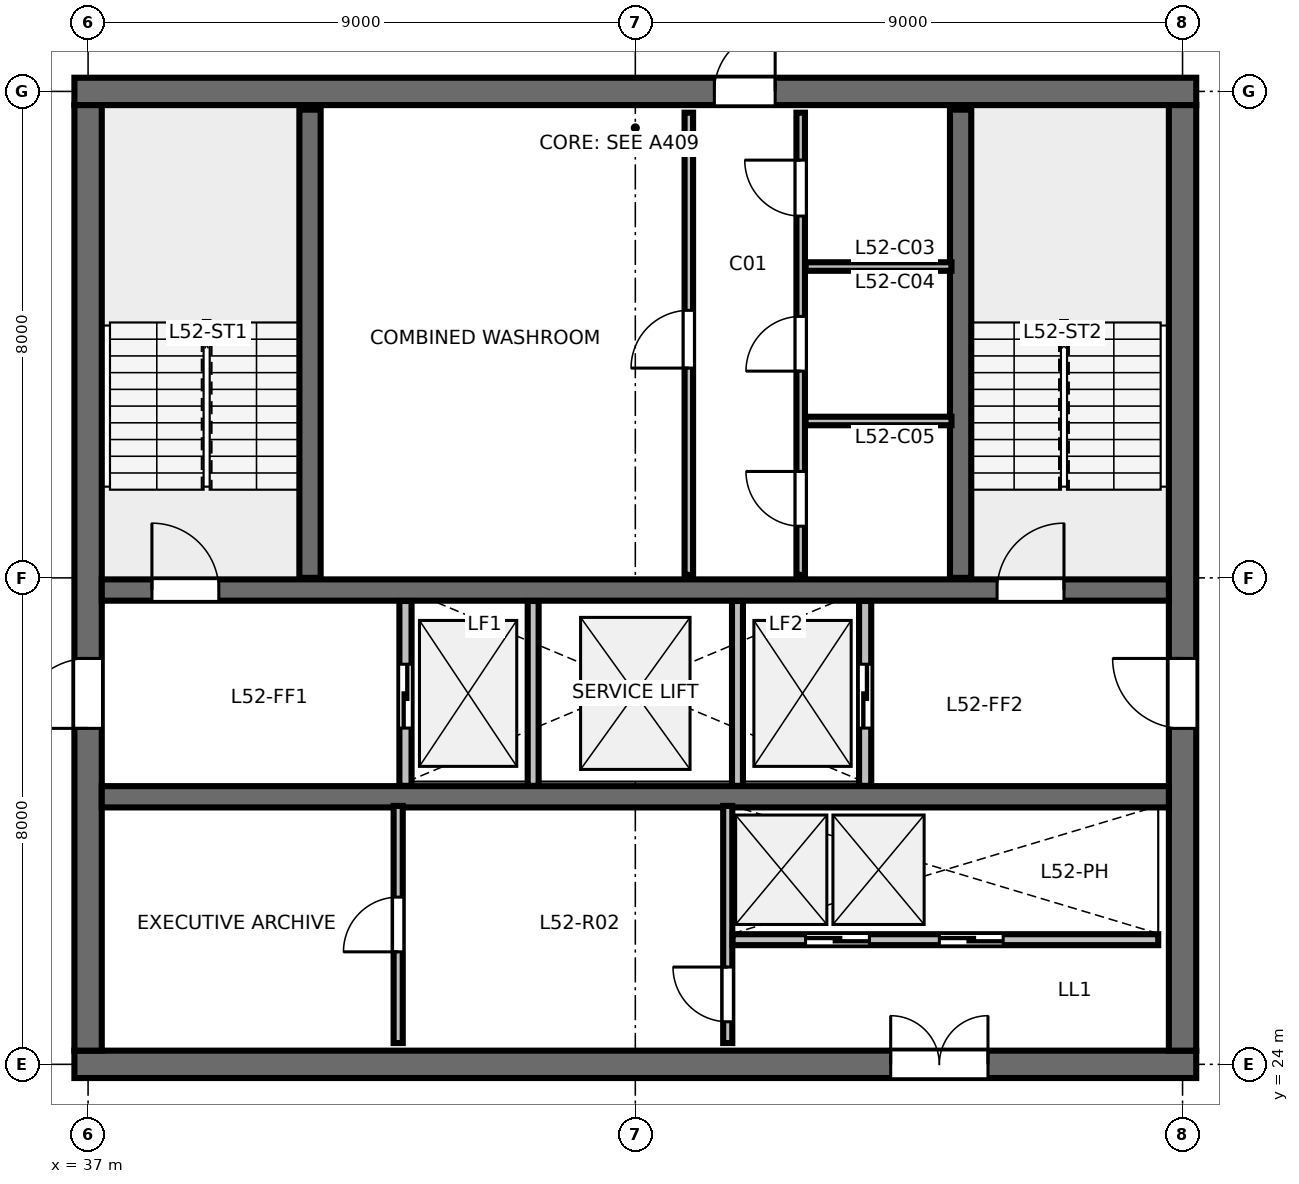
"""IFC4 building model, lengths in metres.
Left out: names, types, materials, properties, quantities, classifications, styles, units other than length and angle.
Written with IfcOpenShell. Run it as: python <this file> out.ifc"""

import sys

from ifc_helpers import new_model, si_unit, direction, frame, frame_2d, origin, place, context, subcontext, project, spatial, rectangle, extrude, element, fill, save


model = new_model("IFC4")
c1 = context("Model", 3, precision=1e-05, world=origin(), true_north=direction((0.0, 1.0)))
c2 = subcontext(c1, "Body", "Model", "MODEL_VIEW")
j1 = project(units=[si_unit("LENGTHUNIT", "METRE"), si_unit("PLANEANGLEUNIT", "RADIAN")], contexts=[c1])
p1 = place(None, origin())
s1 = spatial("IfcSite", under=j1, at=p1, CompositionType="ELEMENT")
p2 = place(p1, origin())
s2 = spatial("IfcBuilding", under=s1, at=p2, CompositionType="ELEMENT")
p3 = place(p2, frame((0.0, 0.0, 198.6)))
s3 = spatial("IfcBuildingStorey", under=s2, at=p3, CompositionType="ELEMENT", Elevation=198.6)
p4 = place(p3, frame((36.775, 24.0, 0.0), z_axis=(0.0, 0.0, 1.0), x_axis=(1.0, 0.0, 0.0)))
e1 = element("IfcWall", 1, at=p4, inside=s3, PredefinedType="SHEAR", context=c2, shape_type="SweptSolid", body=[
    extrude(rectangle(XDim=18.45, YDim=0.45, at=frame_2d((9.225, 0.0))), origin(), (0.0, 0.0, 1.0), 3.36),
])
p5 = place(p4, frame((13.425, 0.0, 0.0)))
e2 = element("IfcOpeningElement", 2, at=p5, cuts=e1, PredefinedType="OPENING", context=c2, shape_type="SweptSolid", body=[
    extrude(rectangle(XDim=1.6, YDim=2.15, at=frame_2d((0.8, 1.075))), frame((0.0, 0.235, 0.0), z_axis=(0.0, -1.0, 0.0), x_axis=(1.0, 0.0, 0.0)), (0.0, 0.0, 1.0), 0.47),
])
p6 = place(p3, frame((36.775, 40.0, 0.0), z_axis=(0.0, 0.0, 1.0), x_axis=(1.0, 0.0, 0.0)))
e3 = element("IfcWall", 3, at=p6, inside=s3, PredefinedType="SHEAR", context=c2, shape_type="SweptSolid", body=[
    extrude(rectangle(XDim=18.45, YDim=0.45, at=frame_2d((9.225, 0.0))), origin(), (0.0, 0.0, 1.0), 3.36),
])
p7 = place(p6, frame((10.525, 0.0, 0.0)))
e4 = element("IfcOpeningElement", 4, at=p7, cuts=e3, PredefinedType="OPENING", context=c2, shape_type="SweptSolid", body=[
    extrude(rectangle(XDim=1.0, YDim=2.15, at=frame_2d((0.5, 1.075))), frame((0.0, 0.235, 0.0), z_axis=(0.0, -1.0, 0.0), x_axis=(1.0, 0.0, 0.0)), (0.0, 0.0, 1.0), 0.47),
])
p8 = place(p3, frame((37.0, 24.225, 0.0), z_axis=(0.0, 0.0, 1.0), x_axis=(0.0, 1.0, 0.0)))
e5 = element("IfcWall", 5, at=p8, inside=s3, PredefinedType="SHEAR", context=c2, shape_type="SweptSolid", body=[
    extrude(rectangle(XDim=15.55, YDim=0.45, at=frame_2d((7.775, 0.0))), origin(), (0.0, 0.0, 1.0), 3.36),
])
p9 = place(p8, frame((5.3, 0.0, 0.0)))
e6 = element("IfcOpeningElement", 6, at=p9, cuts=e5, PredefinedType="OPENING", context=c2, shape_type="SweptSolid", body=[
    extrude(rectangle(XDim=1.15, YDim=2.15, at=frame_2d((0.575, 1.075))), frame((0.0, 0.235, 0.0), z_axis=(0.0, -1.0, 0.0), x_axis=(1.0, 0.0, 0.0)), (0.0, 0.0, 1.0), 0.47),
])
p10 = place(p3, frame((55.0, 24.225, 0.0), z_axis=(0.0, 0.0, 1.0), x_axis=(0.0, 1.0, 0.0)))
e7 = element("IfcWall", 7, at=p10, inside=s3, PredefinedType="SHEAR", context=c2, shape_type="SweptSolid", body=[
    extrude(rectangle(XDim=15.55, YDim=0.45, at=frame_2d((7.775, 0.0))), origin(), (0.0, 0.0, 1.0), 3.36),
])
p11 = place(p10, frame((5.3, 0.0, 0.0)))
e8 = element("IfcOpeningElement", 8, at=p11, cuts=e7, PredefinedType="OPENING", context=c2, shape_type="SweptSolid", body=[
    extrude(rectangle(XDim=1.15, YDim=2.15, at=frame_2d((0.575, 1.075))), frame((0.0, 0.235, 0.0), z_axis=(0.0, -1.0, 0.0), x_axis=(1.0, 0.0, 0.0)), (0.0, 0.0, 1.0), 0.47),
])
p12 = place(p3, frame((37.225, 31.8, 0.0), z_axis=(0.0, 0.0, 1.0), x_axis=(1.0, 0.0, 0.0)))
e9 = element("IfcWall", 9, at=p12, inside=s3, PredefinedType="SHEAR", context=c2, shape_type="SweptSolid", body=[
    extrude(rectangle(XDim=17.55, YDim=0.35, at=frame_2d((8.775, 0.0))), origin(), (0.0, 0.0, 1.0), 3.36),
])
p13 = place(p12, frame((0.825, 0.0, 0.0)))
e10 = element("IfcOpeningElement", 10, at=p13, cuts=e9, PredefinedType="OPENING", context=c2, shape_type="SweptSolid", body=[
    extrude(rectangle(XDim=1.1, YDim=2.15, at=frame_2d((0.55, 1.075))), frame((0.0, 0.185, 0.0), z_axis=(0.0, -1.0, 0.0), x_axis=(1.0, 0.0, 0.0)), (0.0, 0.0, 1.0), 0.37),
])
p14 = place(p12, frame((14.725, 0.0, 0.0)))
e11 = element("IfcOpeningElement", 11, at=p14, cuts=e9, PredefinedType="OPENING", context=c2, shape_type="SweptSolid", body=[
    extrude(rectangle(XDim=1.1, YDim=2.15, at=frame_2d((0.55, 1.075))), frame((0.0, 0.185, 0.0), z_axis=(0.0, -1.0, 0.0), x_axis=(1.0, 0.0, 0.0)), (0.0, 0.0, 1.0), 0.37),
])
p15 = place(p3, frame((37.225, 28.4, 0.0), z_axis=(0.0, 0.0, 1.0), x_axis=(1.0, 0.0, 0.0)))
e12 = element("IfcWall", 12, at=p15, inside=s3, PredefinedType="SHEAR", context=c2, shape_type="SweptSolid", body=[
    extrude(rectangle(XDim=17.55, YDim=0.35, at=frame_2d((8.775, 0.0))), origin(), (0.0, 0.0, 1.0), 3.36),
])
for number, where, z_axis, x_axis in (
    (13, (40.65, 32.0, 0.0), (0.0, 0.0, 1.0), (0.0, 1.0, 0.0)),
    (14, (51.35, 32.0, 0.0), (0.0, 0.0, 1.0), (0.0, 1.0, 0.0)),
):
    element("IfcWall", number, at=place(p3, frame(where, z_axis=z_axis, x_axis=x_axis)), inside=s3, PredefinedType="SHEAR", context=c2, shape_type="SweptSolid", body=[
        extrude(rectangle(XDim=7.7, YDim=0.35, at=frame_2d((3.85, 0.0))), origin(), (0.0, 0.0, 1.0), 3.6),
    ])
p16 = place(p3, frame((46.88, 32.05, 0.0), z_axis=(0.0, 0.0, 1.0), x_axis=(0.0, 1.0, 0.0)))
e15 = element("IfcWall", 15, at=p16, inside=s3, PredefinedType="PARTITIONING", context=c2, shape_type="SweptSolid", body=[
    extrude(rectangle(XDim=7.6, YDim=0.14, at=frame_2d((3.8, 0.0))), origin(), (0.0, 0.0, 1.0), 3.375),
])
p17 = place(p16, frame((3.4, 0.0, 0.0)))
e16 = element("IfcOpeningElement", 16, at=p17, cuts=e15, PredefinedType="OPENING", context=c2, shape_type="SweptSolid", body=[
    extrude(rectangle(XDim=0.95, YDim=2.15, at=frame_2d((0.475, 1.075))), frame((0.0, 0.08, 0.0), z_axis=(0.0, -1.0, 0.0), x_axis=(1.0, 0.0, 0.0)), (0.0, 0.0, 1.0), 0.16),
])
p18 = place(p3, frame((48.72, 32.05, 0.0), z_axis=(0.0, 0.0, 1.0), x_axis=(0.0, 1.0, 0.0)))
e17 = element("IfcWall", 17, at=p18, inside=s3, PredefinedType="PARTITIONING", context=c2, shape_type="SweptSolid", body=[
    extrude(rectangle(XDim=7.6, YDim=0.14, at=frame_2d((3.8, 0.0))), origin(), (0.0, 0.0, 1.0), 3.375),
])
p19 = place(p18, frame((0.8, 0.0, 0.0)))
e18 = element("IfcOpeningElement", 18, at=p19, cuts=e17, PredefinedType="OPENING", context=c2, shape_type="SweptSolid", body=[
    extrude(rectangle(XDim=0.9, YDim=2.15, at=frame_2d((0.45, 1.075))), frame((0.0, 0.08, 0.0), z_axis=(0.0, -1.0, 0.0), x_axis=(1.0, 0.0, 0.0)), (0.0, 0.0, 1.0), 0.16),
])
p20 = place(p18, frame((3.35, 0.0, 0.0)))
e19 = element("IfcOpeningElement", 19, at=p20, cuts=e17, PredefinedType="OPENING", context=c2, shape_type="SweptSolid", body=[
    extrude(rectangle(XDim=0.9, YDim=2.15, at=frame_2d((0.45, 1.075))), frame((0.0, 0.08, 0.0), z_axis=(0.0, -1.0, 0.0), x_axis=(1.0, 0.0, 0.0)), (0.0, 0.0, 1.0), 0.16),
])
p21 = place(p18, frame((5.9, 0.0, 0.0)))
e20 = element("IfcOpeningElement", 20, at=p21, cuts=e17, PredefinedType="OPENING", context=c2, shape_type="SweptSolid", body=[
    extrude(rectangle(XDim=0.92, YDim=2.15, at=frame_2d((0.46, 1.075))), frame((0.0, 0.08, 0.0), z_axis=(0.0, -1.0, 0.0), x_axis=(1.0, 0.0, 0.0)), (0.0, 0.0, 1.0), 0.16),
])
for number, where, z_axis, x_axis in (
    (21, (48.8, 34.58, 0.0), (0.0, 0.0, 1.0), (1.0, 0.0, 0.0)),
    (22, (48.8, 37.12, 0.0), (0.0, 0.0, 1.0), (1.0, 0.0, 0.0)),
):
    element("IfcWall", number, at=place(p3, frame(where, z_axis=z_axis, x_axis=x_axis)), inside=s3, PredefinedType="PARTITIONING", context=c2, shape_type="SweptSolid", body=[
        extrude(rectangle(XDim=2.4, YDim=0.14, at=frame_2d((1.2, 0.0))), origin(), (0.0, 0.0, 1.0), 3.375),
    ])
p22 = place(p3, frame((42.22, 28.58, 0.0), z_axis=(0.0, 0.0, 1.0), x_axis=(0.0, 1.0, 0.0)))
e23 = element("IfcWall", 23, at=p22, inside=s3, PredefinedType="PARTITIONING", context=c2, shape_type="SweptSolid", body=[
    extrude(rectangle(XDim=3.04, YDim=0.2, at=frame_2d((1.52, 0.0))), origin(), (0.0, 0.0, 1.0), 3.375),
])
p23 = place(p22, frame((0.95, 0.0, 0.0)))
e24 = element("IfcOpeningElement", 24, at=p23, cuts=e23, PredefinedType="OPENING", context=c2, shape_type="SweptSolid", body=[
    extrude(rectangle(XDim=1.05, YDim=2.15, at=frame_2d((0.525, 1.075))), frame((0.0, 0.11, 0.0), z_axis=(0.0, -1.0, 0.0), x_axis=(1.0, 0.0, 0.0)), (0.0, 0.0, 1.0), 0.22),
])
p24 = place(p3, frame((49.78, 28.58, 0.0), z_axis=(0.0, 0.0, 1.0), x_axis=(0.0, 1.0, 0.0)))
e25 = element("IfcWall", 25, at=p24, inside=s3, PredefinedType="PARTITIONING", context=c2, shape_type="SweptSolid", body=[
    extrude(rectangle(XDim=3.04, YDim=0.2, at=frame_2d((1.52, 0.0))), origin(), (0.0, 0.0, 1.0), 3.375),
])
p25 = place(p24, frame((0.95, 0.0, 0.0)))
e26 = element("IfcOpeningElement", 26, at=p25, cuts=e25, PredefinedType="OPENING", context=c2, shape_type="SweptSolid", body=[
    extrude(rectangle(XDim=1.05, YDim=2.15, at=frame_2d((0.525, 1.075))), frame((0.0, 0.11, 0.0), z_axis=(0.0, -1.0, 0.0), x_axis=(1.0, 0.0, 0.0)), (0.0, 0.0, 1.0), 0.22),
])
for number, where, z_axis, x_axis in (
    (27, (44.32, 28.58, 0.0), (0.0, 0.0, 1.0), (0.0, 1.0, 0.0)),
    (28, (47.68, 28.58, 0.0), (0.0, 0.0, 1.0), (0.0, 1.0, 0.0)),
):
    element("IfcWall", number, at=place(p3, frame(where, z_axis=z_axis, x_axis=x_axis)), inside=s3, PredefinedType="PARTITIONING", context=c2, shape_type="SweptSolid", body=[
        extrude(rectangle(XDim=3.04, YDim=0.18, at=frame_2d((1.52, 0.0))), origin(), (0.0, 0.0, 1.0), 3.375),
    ])
p26 = place(p3, frame((42.1, 24.35, 0.0), z_axis=(0.0, 0.0, 1.0), x_axis=(0.0, 1.0, 0.0)))
e29 = element("IfcWall", 29, at=p26, inside=s3, PredefinedType="PARTITIONING", context=c2, shape_type="SweptSolid", body=[
    extrude(rectangle(XDim=3.9, YDim=0.15, at=frame_2d((1.95, 0.0))), origin(), (0.0, 0.0, 1.0), 3.375),
])
p27 = place(p26, frame((1.5, 0.0, 0.0)))
e30 = element("IfcOpeningElement", 30, at=p27, cuts=e29, PredefinedType="OPENING", context=c2, shape_type="SweptSolid", body=[
    extrude(rectangle(XDim=0.9, YDim=2.15, at=frame_2d((0.45, 1.075))), frame((0.0, 0.085, 0.0), z_axis=(0.0, -1.0, 0.0), x_axis=(1.0, 0.0, 0.0)), (0.0, 0.0, 1.0), 0.17),
])
p28 = place(p3, frame((47.52, 24.35, 0.0), z_axis=(0.0, 0.0, 1.0), x_axis=(0.0, 1.0, 0.0)))
e31 = element("IfcWall", 31, at=p28, inside=s3, PredefinedType="PARTITIONING", context=c2, shape_type="SweptSolid", body=[
    extrude(rectangle(XDim=3.9, YDim=0.15, at=frame_2d((1.95, 0.0))), origin(), (0.0, 0.0, 1.0), 3.375),
])
p29 = place(p28, frame((0.35, 0.0, 0.0)))
e32 = element("IfcOpeningElement", 32, at=p29, cuts=e31, PredefinedType="OPENING", context=c2, shape_type="SweptSolid", body=[
    extrude(rectangle(XDim=0.9, YDim=2.15, at=frame_2d((0.45, 1.075))), frame((0.0, 0.085, 0.0), z_axis=(0.0, -1.0, 0.0), x_axis=(1.0, 0.0, 0.0)), (0.0, 0.0, 1.0), 0.17),
])
p30 = place(p3, frame((47.6, 26.05, 0.0), z_axis=(0.0, 0.0, 1.0), x_axis=(1.0, 0.0, 0.0)))
e33 = element("IfcWall", 33, at=p30, inside=s3, PredefinedType="PARTITIONING", context=c2, shape_type="SweptSolid", body=[
    extrude(rectangle(XDim=7.0, YDim=0.18, at=frame_2d((3.5, 0.0))), origin(), (0.0, 0.0, 1.0), 3.375),
])
p31 = place(p30, frame((1.2, 0.0, 0.0)))
e34 = element("IfcOpeningElement", 34, at=p31, cuts=e33, PredefinedType="OPENING", context=c2, shape_type="SweptSolid", body=[
    extrude(rectangle(XDim=1.05, YDim=2.15, at=frame_2d((0.525, 1.075))), frame((0.0, 0.1, 0.0), z_axis=(0.0, -1.0, 0.0), x_axis=(1.0, 0.0, 0.0)), (0.0, 0.0, 1.0), 0.2),
])
p32 = place(p30, frame((3.4, 0.0, 0.0)))
e35 = element("IfcOpeningElement", 35, at=p32, cuts=e33, PredefinedType="OPENING", context=c2, shape_type="SweptSolid", body=[
    extrude(rectangle(XDim=1.05, YDim=2.15, at=frame_2d((0.525, 1.075))), frame((0.0, 0.1, 0.0), z_axis=(0.0, -1.0, 0.0), x_axis=(1.0, 0.0, 0.0)), (0.0, 0.0, 1.0), 0.2),
])
p33 = place(p13, origin())
e36 = element("IfcDoor", 36, at=p33, inside=s3, OperationType="SINGLE_SWING_LEFT", PredefinedType="DOOR", context=c2, shape_type="SweptSolid", body=[
    extrude(rectangle(XDim=1.1, YDim=2.15, at=frame_2d((0.55, 1.075))), frame((0.0, 0.025, 0.0), z_axis=(0.0, -1.0, 0.0), x_axis=(1.0, 0.0, 0.0)), (0.0, 0.0, 1.0), 0.05),
])
fill(e10, e36)
p34 = place(p14, origin())
e37 = element("IfcDoor", 37, at=p34, inside=s3, OperationType="SINGLE_SWING_RIGHT", PredefinedType="DOOR", context=c2, shape_type="SweptSolid", body=[
    extrude(rectangle(XDim=1.1, YDim=2.15, at=frame_2d((0.55, 1.075))), frame((0.0, 0.025, 0.0), z_axis=(0.0, -1.0, 0.0), x_axis=(1.0, 0.0, 0.0)), (0.0, 0.0, 1.0), 0.05),
])
fill(e11, e37)
p35 = place(p7, origin())
e38 = element("IfcDoor", 38, at=p35, inside=s3, OperationType="SINGLE_SWING_RIGHT", PredefinedType="DOOR", context=c2, shape_type="SweptSolid", body=[
    extrude(rectangle(XDim=1.0, YDim=2.15, at=frame_2d((0.5, 1.075))), frame((0.0, 0.025, 0.0), z_axis=(0.0, -1.0, 0.0), x_axis=(1.0, 0.0, 0.0)), (0.0, 0.0, 1.0), 0.05),
])
fill(e4, e38)
p36 = place(p9, origin())
e39 = element("IfcDoor", 39, at=p36, inside=s3, OperationType="SINGLE_SWING_LEFT", PredefinedType="DOOR", context=c2, shape_type="SweptSolid", body=[
    extrude(rectangle(XDim=1.15, YDim=2.15, at=frame_2d((0.575, 1.075))), frame((0.0, 0.025, 0.0), z_axis=(0.0, -1.0, 0.0), x_axis=(1.0, 0.0, 0.0)), (0.0, 0.0, 1.0), 0.05),
])
fill(e6, e39)
p37 = place(p11, origin())
e40 = element("IfcDoor", 40, at=p37, inside=s3, OperationType="SINGLE_SWING_RIGHT", PredefinedType="DOOR", context=c2, shape_type="SweptSolid", body=[
    extrude(rectangle(XDim=1.15, YDim=2.15, at=frame_2d((0.575, 1.075))), frame((0.0, 0.025, 0.0), z_axis=(0.0, -1.0, 0.0), x_axis=(1.0, 0.0, 0.0)), (0.0, 0.0, 1.0), 0.05),
])
fill(e8, e40)
p38 = place(p5, origin())
e41 = element("IfcDoor", 41, at=p38, inside=s3, OperationType="DOUBLE_DOOR_SINGLE_SWING", PredefinedType="DOOR", context=c2, shape_type="SweptSolid", body=[
    extrude(rectangle(XDim=1.6, YDim=2.15, at=frame_2d((0.8, 1.075))), frame((0.0, 0.025, 0.0), z_axis=(0.0, -1.0, 0.0), x_axis=(1.0, 0.0, 0.0)), (0.0, 0.0, 1.0), 0.05),
])
fill(e2, e41)
p39 = place(p17, origin())
e42 = element("IfcDoor", 42, at=p39, inside=s3, OperationType="SINGLE_SWING_LEFT", PredefinedType="DOOR", context=c2, shape_type="SweptSolid", body=[
    extrude(rectangle(XDim=0.95, YDim=2.15, at=frame_2d((0.475, 1.075))), frame((0.0, 0.025, 0.0), z_axis=(0.0, -1.0, 0.0), x_axis=(1.0, 0.0, 0.0)), (0.0, 0.0, 1.0), 0.05),
])
fill(e16, e42)
p40 = place(p19, origin())
e43 = element("IfcDoor", 43, at=p40, inside=s3, OperationType="SINGLE_SWING_RIGHT", PredefinedType="DOOR", context=c2, shape_type="SweptSolid", body=[
    extrude(rectangle(XDim=0.9, YDim=2.15, at=frame_2d((0.45, 1.075))), frame((0.0, 0.025, 0.0), z_axis=(0.0, -1.0, 0.0), x_axis=(1.0, 0.0, 0.0)), (0.0, 0.0, 1.0), 0.05),
])
fill(e18, e43)
p41 = place(p20, origin())
e44 = element("IfcDoor", 44, at=p41, inside=s3, OperationType="SINGLE_SWING_LEFT", PredefinedType="DOOR", context=c2, shape_type="SweptSolid", body=[
    extrude(rectangle(XDim=0.9, YDim=2.15, at=frame_2d((0.45, 1.075))), frame((0.0, 0.025, 0.0), z_axis=(0.0, -1.0, 0.0), x_axis=(1.0, 0.0, 0.0)), (0.0, 0.0, 1.0), 0.05),
])
fill(e19, e44)
p42 = place(p21, origin())
e45 = element("IfcDoor", 45, at=p42, inside=s3, OperationType="SINGLE_SWING_RIGHT", PredefinedType="DOOR", context=c2, shape_type="SweptSolid", body=[
    extrude(rectangle(XDim=0.92, YDim=2.15, at=frame_2d((0.46, 1.075))), frame((0.0, 0.025, 0.0), z_axis=(0.0, -1.0, 0.0), x_axis=(1.0, 0.0, 0.0)), (0.0, 0.0, 1.0), 0.05),
])
fill(e20, e45)
p43 = place(p23, origin())
e46 = element("IfcDoor", 46, at=p43, inside=s3, OperationType="SLIDING_TO_LEFT", PredefinedType="DOOR", context=c2, shape_type="SweptSolid", body=[
    extrude(rectangle(XDim=1.05, YDim=2.15, at=frame_2d((0.525, 1.075))), frame((0.0, 0.025, 0.0), z_axis=(0.0, -1.0, 0.0), x_axis=(1.0, 0.0, 0.0)), (0.0, 0.0, 1.0), 0.05),
])
fill(e24, e46)
p44 = place(p25, origin())
e47 = element("IfcDoor", 47, at=p44, inside=s3, OperationType="SLIDING_TO_RIGHT", PredefinedType="DOOR", context=c2, shape_type="SweptSolid", body=[
    extrude(rectangle(XDim=1.05, YDim=2.15, at=frame_2d((0.525, 1.075))), frame((0.0, 0.025, 0.0), z_axis=(0.0, -1.0, 0.0), x_axis=(1.0, 0.0, 0.0)), (0.0, 0.0, 1.0), 0.05),
])
fill(e26, e47)
p45 = place(p27, origin())
e48 = element("IfcDoor", 48, at=p45, inside=s3, OperationType="SINGLE_SWING_LEFT", PredefinedType="DOOR", context=c2, shape_type="SweptSolid", body=[
    extrude(rectangle(XDim=0.9, YDim=2.15, at=frame_2d((0.45, 1.075))), frame((0.0, 0.025, 0.0), z_axis=(0.0, -1.0, 0.0), x_axis=(1.0, 0.0, 0.0)), (0.0, 0.0, 1.0), 0.05),
])
fill(e30, e48)
p46 = place(p29, origin())
e49 = element("IfcDoor", 49, at=p46, inside=s3, OperationType="SINGLE_SWING_RIGHT", PredefinedType="DOOR", context=c2, shape_type="SweptSolid", body=[
    extrude(rectangle(XDim=0.9, YDim=2.15, at=frame_2d((0.45, 1.075))), frame((0.0, 0.025, 0.0), z_axis=(0.0, -1.0, 0.0), x_axis=(1.0, 0.0, 0.0)), (0.0, 0.0, 1.0), 0.05),
])
fill(e32, e49)
p47 = place(p31, origin())
e50 = element("IfcDoor", 50, at=p47, inside=s3, OperationType="SLIDING_TO_LEFT", PredefinedType="DOOR", context=c2, shape_type="SweptSolid", body=[
    extrude(rectangle(XDim=1.05, YDim=2.15, at=frame_2d((0.525, 1.075))), frame((0.0, 0.025, 0.0), z_axis=(0.0, -1.0, 0.0), x_axis=(1.0, 0.0, 0.0)), (0.0, 0.0, 1.0), 0.05),
])
fill(e34, e50)
p48 = place(p32, origin())
e51 = element("IfcDoor", 51, at=p48, inside=s3, OperationType="SLIDING_TO_RIGHT", PredefinedType="DOOR", context=c2, shape_type="SweptSolid", body=[
    extrude(rectangle(XDim=1.05, YDim=2.15, at=frame_2d((0.525, 1.075))), frame((0.0, 0.025, 0.0), z_axis=(0.0, -1.0, 0.0), x_axis=(1.0, 0.0, 0.0)), (0.0, 0.0, 1.0), 0.05),
])
fill(e35, e51)
save(model, sys.argv[1])
